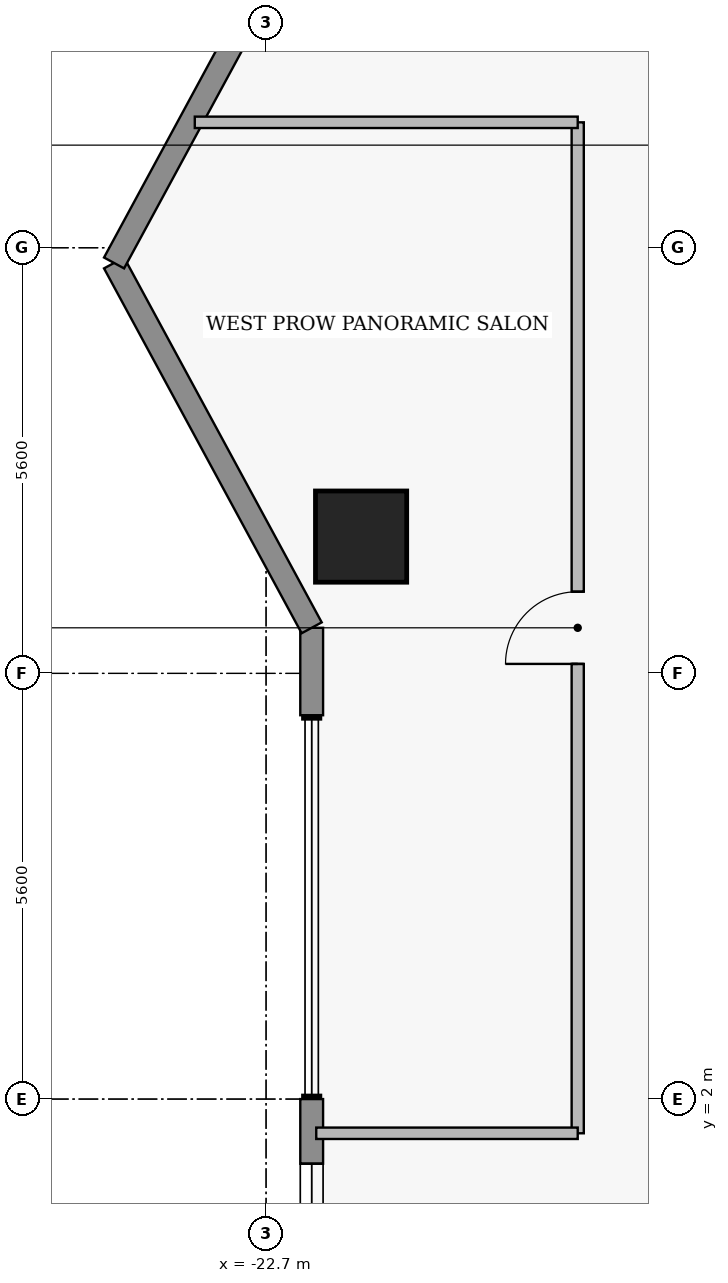
"""IFC4 building model, lengths in metres.
Left out: names, types, materials, properties, quantities, classifications, styles, units other than length and angle.
Written with IfcOpenShell. Run it as: python <this file> out.ifc"""

import sys

from ifc_helpers import new_model, si_unit, direction, frame, frame_2d, origin, origin_2d, place, context, subcontext, project, spatial, rectangle, extrude, element, fill, save


model = new_model("IFC4")
c1 = context("Model", 3, precision=1e-05, world=origin(), true_north=direction((0.0, 1.0)))
c2 = subcontext(c1, "Body", "Model", "MODEL_VIEW")
j1 = project(units=[si_unit("LENGTHUNIT", "METRE"), si_unit("PLANEANGLEUNIT", "RADIAN")], contexts=[c1])
p1 = place(None, origin())
s1 = spatial("IfcSite", under=j1, at=p1, CompositionType="ELEMENT")
p2 = place(p1, origin())
s2 = spatial("IfcBuilding", under=s1, at=p2, CompositionType="ELEMENT")
p3 = place(p2, frame((0.0, 0.0, 211.15)))
s3 = spatial("IfcBuildingStorey", under=s2, at=p3, CompositionType="ELEMENT", Elevation=211.15)
p4 = place(p3, frame((-21.45, 9.4, 0.0), z_axis=(0.0, 0.0, 1.0), x_axis=(1.0, 0.0, 0.0)))
e1 = element("IfcColumn", 1, at=p4, inside=s3, PredefinedType="COLUMN", context=c2, shape_type="SweptSolid", body=[
    extrude(rectangle(XDim=1.2, YDim=1.2, at=origin_2d()), origin(), (0.0, 0.0, 1.0), 3.75),
])
p5 = place(p3, frame((-22.1, -0.85, 0.0), z_axis=(0.0, 0.0, 1.0), x_axis=(0.0, 1.0, 0.0)))
e2 = element("IfcWall", 2, at=p5, inside=s3, PredefinedType="STANDARD", context=c2, shape_type="SweptSolid", body=[
    extrude(rectangle(XDim=2.85, YDim=0.3, at=frame_2d((1.425, 0.0))), origin(), (0.0, 0.0, 1.0), 3.53),
])
p6 = place(p5, frame((0.85, 0.0, 0.95)))
e3 = element("IfcOpeningElement", 3, at=p6, cuts=e2, PredefinedType="OPENING", context=c2, shape_type="SweptSolid", body=[
    extrude(rectangle(XDim=1.15, YDim=1.55, at=frame_2d((0.575, 0.775))), frame((0.0, 0.16, 0.0), z_axis=(0.0, -1.0, 0.0), x_axis=(1.0, 0.0, 0.0)), (0.0, 0.0, 1.0), 0.32),
])
p7 = place(p3, frame((-22.1, 7.05, 0.0), z_axis=(0.0, 0.0, 1.0), x_axis=(0.0, 1.0, 0.0)))
e4 = element("IfcWall", 4, at=p7, inside=s3, PredefinedType="STANDARD", context=c2, shape_type="SweptSolid", body=[
    extrude(rectangle(XDim=1.15, YDim=0.3, at=frame_2d((0.575, 0.0))), origin(), (0.0, 0.0, 1.0), 3.53),
])
for number, where, z_axis, x_axis in (
    (5, (-22.1, 8.2, 0.0), (0.0, 0.0, 1.0), (-0.476, 0.879, 0.0)),
    (6, (-24.7, 13.0, 0.0), (0.0, 0.0, 1.0), (0.476, 0.879, 0.0)),
):
    element("IfcWall", number, at=place(p3, frame(where, z_axis=z_axis, x_axis=x_axis)), inside=s3, PredefinedType="STANDARD", context=c2, shape_type="SweptSolid", body=[
        extrude(rectangle(XDim=5.459, YDim=0.3, at=frame_2d((2.729, 0.0))), origin(), (0.0, 0.0, 1.0), 3.53),
    ])
p8 = place(p3, frame((-18.6, 1.55, 0.0), z_axis=(0.0, 0.0, 1.0), x_axis=(0.0, 1.0, 0.0)))
e7 = element("IfcWall", 7, at=p8, inside=s3, PredefinedType="PARTITIONING", context=c2, shape_type="SweptSolid", body=[
    extrude(rectangle(XDim=13.3, YDim=0.16, at=frame_2d((6.65, 0.0))), origin(), (0.0, 0.0, 1.0), 3.53),
])
p9 = place(p8, frame((6.175, 0.0, 0.0)))
e8 = element("IfcOpeningElement", 8, at=p9, cuts=e7, PredefinedType="OPENING", context=c2, shape_type="SweptSolid", body=[
    extrude(rectangle(XDim=0.95, YDim=2.15, at=frame_2d((0.475, 1.075))), frame((0.0, 0.09, 0.0), z_axis=(0.0, -1.0, 0.0), x_axis=(1.0, 0.0, 0.0)), (0.0, 0.0, 1.0), 0.18),
])
p10 = place(p3, frame((-22.04, 1.55, 0.0), z_axis=(0.0, 0.0, 1.0), x_axis=(1.0, 0.0, 0.0)))
e9 = element("IfcWall", 9, at=p10, inside=s3, PredefinedType="PARTITIONING", context=c2, shape_type="SweptSolid", body=[
    extrude(rectangle(XDim=3.44, YDim=0.15, at=frame_2d((1.72, 0.0))), origin(), (0.0, 0.0, 1.0), 3.53),
])
p11 = place(p3, frame((-23.638, 14.85, 0.0), z_axis=(0.0, 0.0, 1.0), x_axis=(1.0, 0.0, 0.0)))
e10 = element("IfcWall", 10, at=p11, inside=s3, PredefinedType="PARTITIONING", context=c2, shape_type="SweptSolid", body=[
    extrude(rectangle(XDim=5.038, YDim=0.15, at=frame_2d((2.519, 0.0))), origin(), (0.0, 0.0, 1.0), 3.53),
])
p12 = place(p6, origin())
e11 = element("IfcWindow", 11, at=p12, inside=s3, PartitioningType="SINGLE_PANEL", PredefinedType="WINDOW", context=c2, shape_type="SweptSolid", body=[
    extrude(rectangle(XDim=1.15, YDim=1.55, at=frame_2d((0.575, 0.775))), frame((0.0, 0.03, 0.0), z_axis=(0.0, -1.0, 0.0), x_axis=(1.0, 0.0, 0.0)), (0.0, 0.0, 1.0), 0.06),
])
fill(e3, e11)
p13 = place(p9, origin())
e12 = element("IfcDoor", 12, at=p13, inside=s3, OperationType="SINGLE_SWING_LEFT", PredefinedType="DOOR", context=c2, shape_type="SweptSolid", body=[
    extrude(rectangle(XDim=0.95, YDim=2.15, at=frame_2d((0.475, 1.075))), frame((0.0, 0.025, 0.0), z_axis=(0.0, -1.0, 0.0), x_axis=(1.0, 0.0, 0.0)), (0.0, 0.0, 1.0), 0.05),
])
fill(e8, e12)
save(model, sys.argv[1])
